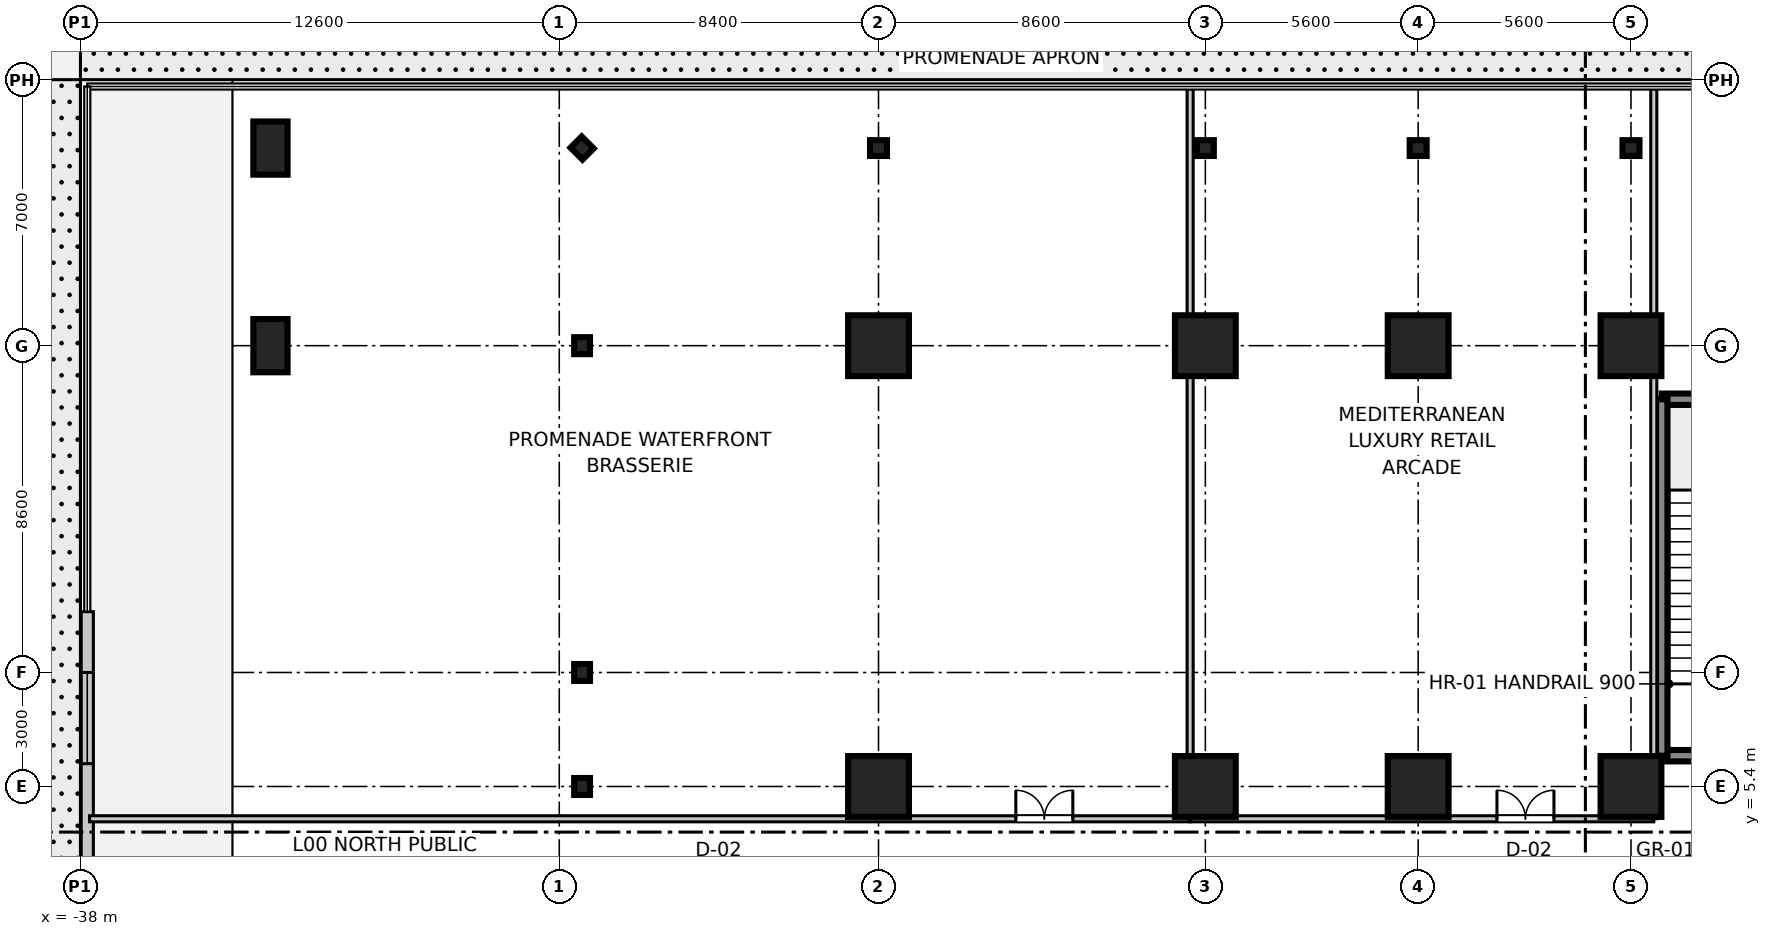
"""IFC4 building model, lengths in metres.
Left out: names, types, materials, properties, quantities, classifications, styles, units other than length and angle.
Written with IfcOpenShell. Run it as: python <this file> out.ifc"""

import sys

from ifc_helpers import new_model, si_unit, direction, frame, frame_2d, origin, origin_2d, place, context, subcontext, project, spatial, rectangle, i_section, extrude, source, transform, mapped, element, fill, save


model = new_model("IFC4")
c1 = context("Model", 3, precision=1e-05, world=origin(), true_north=direction((0.0, 1.0)))
c2 = subcontext(c1, "Body", "Model", "MODEL_VIEW")
j1 = project(units=[si_unit("LENGTHUNIT", "METRE"), si_unit("PLANEANGLEUNIT", "RADIAN")], contexts=[c1])
p1 = place(None, origin())
s1 = spatial("IfcSite", under=j1, at=p1, CompositionType="ELEMENT")
p2 = place(p1, origin())
s2 = spatial("IfcBuilding", under=s1, at=p2, CompositionType="ELEMENT")
p3 = place(p2, origin())
s3 = spatial("IfcBuildingStorey", under=s2, at=p3, CompositionType="ELEMENT", Elevation=0.0)
m1 = source(origin(), c2, "Body", "SweptSolid", [
    extrude(rectangle(XDim=1.6, YDim=1.6, at=origin_2d()), origin(), (0.0, 0.0, 1.0), 5.355),
])
for number, where, z_axis, x_axis in (
    (1, (-17.0, 5.4, 0.0), (0.0, 0.0, 1.0), (1.0, 0.0, 0.0)),
    (2, (-17.0, 17.0, 0.0), (0.0, 0.0, 1.0), (1.0, 0.0, 0.0)),
    (3, (-8.4, 5.4, 0.0), (0.0, 0.0, 1.0), (1.0, 0.0, 0.0)),
    (4, (-8.4, 17.0, 0.0), (0.0, 0.0, 1.0), (1.0, 0.0, 0.0)),
    (5, (-2.8, 5.4, 0.0), (0.0, 0.0, 1.0), (1.0, 0.0, 0.0)),
    (6, (-2.8, 17.0, 0.0), (0.0, 0.0, 1.0), (1.0, 0.0, 0.0)),
    (7, (2.8, 5.4, 0.0), (0.0, 0.0, 1.0), (1.0, 0.0, 0.0)),
    (8, (2.8, 17.0, 0.0), (0.0, 0.0, 1.0), (1.0, 0.0, 0.0)),
):
    element("IfcColumn", number, at=place(p3, frame(where, z_axis=z_axis, x_axis=x_axis)), inside=s3, PredefinedType="COLUMN", context=c2, shape_type="MappedRepresentation", body=[
        mapped(m1, transform((0.0, 0.0, 0.0), scale=1.0)),
    ])
m2 = source(origin(), c2, "Body", "SweptSolid", [
    extrude(rectangle(XDim=0.9, YDim=1.4, at=origin_2d()), origin(), (0.0, 0.0, 1.0), 5.355),
])
for number, where, z_axis, x_axis in (
    (9, (-33.0, 17.0, 0.0), (0.0, 0.0, 1.0), (1.0, 0.0, 0.0)),
    (10, (-33.0, 22.2, 0.0), (0.0, 0.0, 1.0), (1.0, 0.0, 0.0)),
):
    element("IfcColumn", number, at=place(p3, frame(where, z_axis=z_axis, x_axis=x_axis)), inside=s3, PredefinedType="PILASTER", context=c2, shape_type="MappedRepresentation", body=[
        mapped(m2, transform((0.0, 0.0, 0.0), scale=1.0)),
    ])
m3 = source(origin(), c2, "Body", "SweptSolid", [
    extrude(i_section(OverallWidth=0.416, OverallDepth=0.446, WebThickness=0.025, FlangeThickness=0.04, at=origin_2d()), origin(), (0.0, 0.0, 1.0), 5.355),
])
for number, where, z_axis, x_axis in (
    (11, (-24.8, 5.4, 0.0), (0.0, 0.0, 1.0), (1.0, 0.0, 0.0)),
    (12, (-24.8, 8.4, 0.0), (0.0, 0.0, 1.0), (1.0, 0.0, 0.0)),
    (13, (-24.8, 17.0, 0.0), (0.0, 0.0, 1.0), (1.0, 0.0, 0.0)),
    (14, (-17.0, 22.2, 0.0), (0.0, 0.0, 1.0), (0.0, 1.0, 0.0)),
    (15, (-8.4, 22.2, 0.0), (0.0, 0.0, 1.0), (0.0, 1.0, 0.0)),
    (16, (-2.8, 22.2, 0.0), (0.0, 0.0, 1.0), (0.0, 1.0, 0.0)),
    (17, (2.8, 22.2, 0.0), (0.0, 0.0, 1.0), (0.0, 1.0, 0.0)),
    (18, (-24.8, 22.2, 0.0), (0.0, 0.0, 1.0), (0.707, 0.707, 0.0)),
):
    element("IfcColumn", number, at=place(p3, frame(where, z_axis=z_axis, x_axis=x_axis)), inside=s3, PredefinedType="COLUMN", context=c2, shape_type="MappedRepresentation", body=[
        mapped(m3, transform((0.0, 0.0, 0.0), scale=1.0)),
    ])
m4 = source(origin(), c2, "Body", "SweptSolid", [
    extrude(rectangle(XDim=3.98, YDim=0.3, at=frame_2d((1.99, 0.0))), origin(), (0.0, 0.0, 1.0), 5.08),
])
for number, where, z_axis, x_axis in (
    (19, (3.61, 6.21, 0.0), (0.0, 0.0, 1.0), (1.0, 0.0, 0.0)),
    (20, (3.61, 15.59, 0.0), (0.0, 0.0, 1.0), (1.0, 0.0, 0.0)),
):
    element("IfcWall", number, at=place(p3, frame(where, z_axis=z_axis, x_axis=x_axis)), inside=s3, PredefinedType="SHEAR", context=c2, shape_type="MappedRepresentation", body=[
        mapped(m4, transform((0.0, 0.0, 0.0), scale=1.0)),
    ])
m5 = source(origin(), c2, "Body", "SweptSolid", [
    extrude(rectangle(XDim=9.38, YDim=0.3, at=frame_2d((4.69, 0.0))), origin(), (0.0, 0.0, 1.0), 5.08),
])
p4 = place(p3, frame((3.61, 6.21, 0.0), z_axis=(0.0, 0.0, 1.0), x_axis=(0.0, 1.0, 0.0)))
e21 = element("IfcWall", 21, at=p4, inside=s3, PredefinedType="SHEAR", context=c2, shape_type="MappedRepresentation", body=[
    mapped(m5, transform((0.0, 0.0, 0.0), scale=1.0)),
])
m6 = source(origin(), c2, "Body", "SweptSolid", [
    extrude(rectangle(XDim=20.0, YDim=0.32, at=frame_2d((10.0, 0.0))), origin(), (0.0, 0.0, 1.0), 5.08),
])
p5 = place(p3, frame((-37.82, -10.0, 0.0), z_axis=(0.0, 0.0, 1.0), x_axis=(0.0, 1.0, 0.0)))
e22 = element("IfcWall", 22, at=p5, inside=s3, PredefinedType="STANDARD", context=c2, shape_type="MappedRepresentation", body=[
    mapped(m6, transform((0.0, 0.0, 0.0), scale=1.0)),
])
p6 = place(p5, frame((5.4, 0.0, 0.0)))
e23 = element("IfcOpeningElement", 23, at=p6, cuts=e22, PredefinedType="OPENING", context=c2, shape_type="SweptSolid", body=[
    extrude(rectangle(XDim=2.2, YDim=2.6, at=frame_2d((1.1, 1.3))), frame((0.0, 0.17, 0.0), z_axis=(0.0, -1.0, 0.0), x_axis=(1.0, 0.0, 0.0)), (0.0, 0.0, 1.0), 0.34),
])
p7 = place(p5, frame((8.9, 0.0, 0.0)))
e24 = element("IfcOpeningElement", 24, at=p7, cuts=e22, PredefinedType="OPENING", context=c2, shape_type="SweptSolid", body=[
    extrude(rectangle(XDim=2.2, YDim=2.6, at=frame_2d((1.1, 1.3))), frame((0.0, 0.17, 0.0), z_axis=(0.0, -1.0, 0.0), x_axis=(1.0, 0.0, 0.0)), (0.0, 0.0, 1.0), 0.34),
])
p8 = place(p5, frame((1.4, 0.0, 0.9)))
e25 = element("IfcOpeningElement", 25, at=p8, cuts=e22, PredefinedType="OPENING", context=c2, shape_type="SweptSolid", body=[
    extrude(rectangle(XDim=2.4, YDim=2.2, at=frame_2d((1.2, 1.1))), frame((0.0, 0.17, 0.0), z_axis=(0.0, -1.0, 0.0), x_axis=(1.0, 0.0, 0.0)), (0.0, 0.0, 1.0), 0.34),
])
p9 = place(p5, frame((16.0, 0.0, 0.9)))
e26 = element("IfcOpeningElement", 26, at=p9, cuts=e22, PredefinedType="OPENING", context=c2, shape_type="SweptSolid", body=[
    extrude(rectangle(XDim=2.4, YDim=2.2, at=frame_2d((1.2, 1.1))), frame((0.0, 0.17, 0.0), z_axis=(0.0, -1.0, 0.0), x_axis=(1.0, 0.0, 0.0)), (0.0, 0.0, 1.0), 0.34),
])
m7 = source(origin(), c2, "Body", "SweptSolid", [
    extrude(rectangle(XDim=28.96, YDim=0.16, at=frame_2d((14.48, 0.0))), origin(), (0.0, 0.0, 1.0), 3.4),
])
p10 = place(p3, frame((-37.76, 4.55, 0.0), z_axis=(0.0, 0.0, 1.0), x_axis=(1.0, 0.0, 0.0)))
e27 = element("IfcWall", 27, at=p10, inside=s3, PredefinedType="PARTITIONING", context=c2, shape_type="MappedRepresentation", body=[
    mapped(m7, transform((0.0, 0.0, 0.0), scale=1.0)),
])
p11 = place(p10, frame((24.373, 0.0, 0.0)))
e28 = element("IfcOpeningElement", 28, at=p11, cuts=e27, PredefinedType="OPENING", context=c2, shape_type="SweptSolid", body=[
    extrude(rectangle(XDim=1.5, YDim=2.15, at=frame_2d((0.75, 1.075))), frame((0.0, 0.09, 0.0), z_axis=(0.0, -1.0, 0.0), x_axis=(1.0, 0.0, 0.0)), (0.0, 0.0, 1.0), 0.18),
])
m8 = source(origin(), c2, "Body", "SweptSolid", [
    extrude(rectangle(XDim=19.21, YDim=0.16, at=frame_2d((9.605, 0.0))), origin(), (0.0, 0.0, 1.0), 3.4),
])
p12 = place(p3, frame((-8.8, 4.55, 0.0), z_axis=(0.0, 0.0, 1.0), x_axis=(0.0, 1.0, 0.0)))
e29 = element("IfcWall", 29, at=p12, inside=s3, PredefinedType="PARTITIONING", context=c2, shape_type="MappedRepresentation", body=[
    mapped(m8, transform((0.0, 0.0, 0.0), scale=1.0)),
])
m9 = source(origin(), c2, "Body", "SweptSolid", [
    extrude(rectangle(XDim=12.2, YDim=0.16, at=frame_2d((6.1, 0.0))), origin(), (0.0, 0.0, 1.0), 3.4),
])
p13 = place(p3, frame((-8.8, 4.55, 0.0), z_axis=(0.0, 0.0, 1.0), x_axis=(1.0, 0.0, 0.0)))
e30 = element("IfcWall", 30, at=p13, inside=s3, PredefinedType="PARTITIONING", context=c2, shape_type="MappedRepresentation", body=[
    mapped(m9, transform((0.0, 0.0, 0.0), scale=1.0)),
])
p14 = place(p13, frame((8.073, 0.0, 0.0)))
e31 = element("IfcOpeningElement", 31, at=p14, cuts=e30, PredefinedType="OPENING", context=c2, shape_type="SweptSolid", body=[
    extrude(rectangle(XDim=1.5, YDim=2.15, at=frame_2d((0.75, 1.075))), frame((0.0, 0.09, 0.0), z_axis=(0.0, -1.0, 0.0), x_axis=(1.0, 0.0, 0.0)), (0.0, 0.0, 1.0), 0.18),
])
p15 = place(p3, frame((3.4, 4.55, 0.0), z_axis=(0.0, 0.0, 1.0), x_axis=(0.0, 1.0, 0.0)))
e32 = element("IfcWall", 32, at=p15, inside=s3, PredefinedType="PARTITIONING", context=c2, shape_type="MappedRepresentation", body=[
    mapped(m8, transform((0.0, 0.0, 0.0), scale=1.0)),
])
m10 = source(origin(), c2, "Body", "SweptSolid", [
    extrude(rectangle(XDim=2.4, YDim=2.2, at=frame_2d((1.2, 1.1))), frame((0.0, 0.03, 0.0), z_axis=(0.0, -1.0, 0.0), x_axis=(1.0, 0.0, 0.0)), (0.0, 0.0, 1.0), 0.06),
])
p16 = place(p9, origin())
e33 = element("IfcWindow", 33, at=p16, inside=s3, PartitioningType="SINGLE_PANEL", PredefinedType="WINDOW", context=c2, shape_type="MappedRepresentation", body=[
    mapped(m10, transform((0.0, 0.0, 0.0), scale=1.0)),
])
fill(e26, e33)
m11 = source(origin(), c2, "Body", "SweptSolid", [
    extrude(rectangle(XDim=1.5, YDim=2.15, at=frame_2d((0.75, 1.075))), frame((0.0, 0.025, 0.0), z_axis=(0.0, -1.0, 0.0), x_axis=(1.0, 0.0, 0.0)), (0.0, 0.0, 1.0), 0.05),
])
p17 = place(p11, origin())
e34 = element("IfcDoor", 34, at=p17, inside=s3, OperationType="DOUBLE_DOOR_SINGLE_SWING", PredefinedType="DOOR", context=c2, shape_type="MappedRepresentation", body=[
    mapped(m11, transform((0.0, 0.0, 0.0), scale=1.0)),
])
fill(e28, e34)
p18 = place(p14, origin())
e35 = element("IfcDoor", 35, at=p18, inside=s3, OperationType="DOUBLE_DOOR_SINGLE_SWING", PredefinedType="DOOR", context=c2, shape_type="MappedRepresentation", body=[
    mapped(m11, transform((0.0, 0.0, 0.0), scale=1.0)),
])
fill(e31, e35)
save(model, sys.argv[1])
